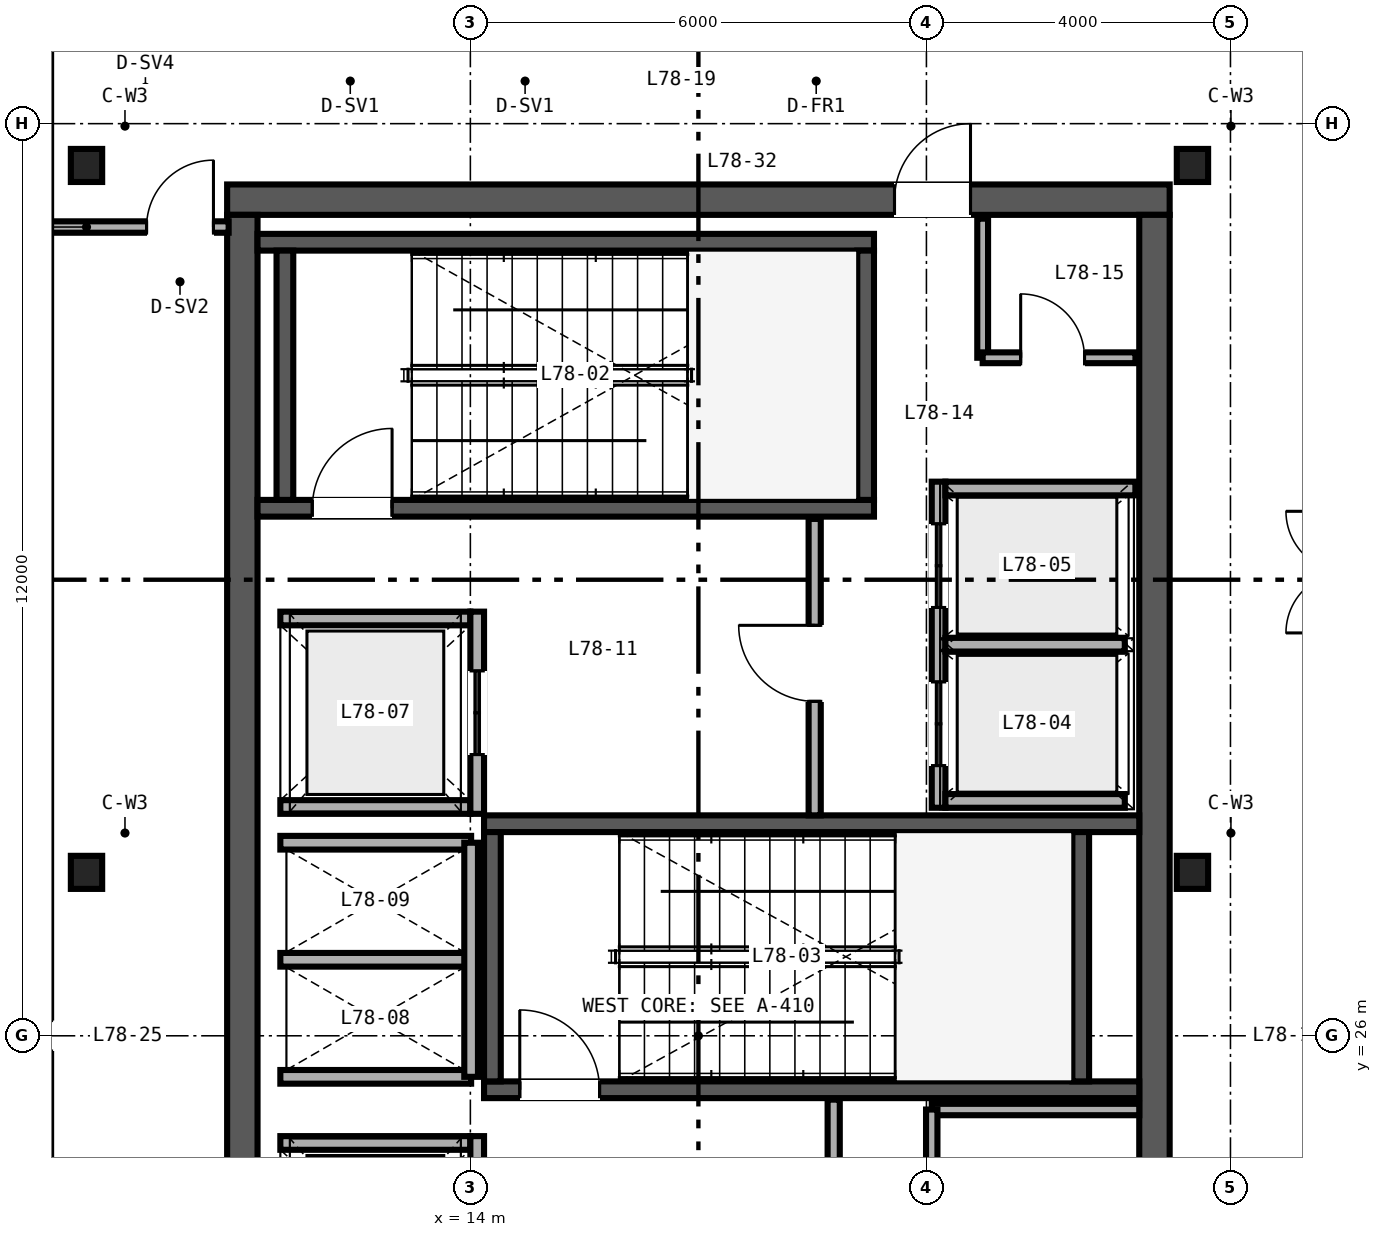
"""IFC4 building model, lengths in metres.
Left out: names, types, materials, properties, quantities, classifications, styles, units other than length and angle.
Written with IfcOpenShell. Run it as: python <this file> out.ifc"""

import sys

from ifc_helpers import new_model, si_unit, direction, frame, frame_2d, origin, origin_2d, place, context, subcontext, project, spatial, rectangle, i_section, extrude, source, transform, mapped, element, fill, save


model = new_model("IFC4")
c1 = context("Model", 3, precision=1e-05, world=origin(), true_north=direction((0.0, 1.0)))
c2 = subcontext(c1, "Body", "Model", "MODEL_VIEW")
j1 = project(units=[si_unit("LENGTHUNIT", "METRE"), si_unit("PLANEANGLEUNIT", "RADIAN")], contexts=[c1])
p1 = place(None, origin())
s1 = spatial("IfcSite", under=j1, at=p1, CompositionType="ELEMENT")
p2 = place(p1, origin())
s2 = spatial("IfcBuilding", under=s1, at=p2, CompositionType="ELEMENT")
p3 = place(p2, frame((0.0, 0.0, 305.4)))
s3 = spatial("IfcBuildingStorey", under=s2, at=p3, CompositionType="ELEMENT", Elevation=305.4)
p4 = place(p3, frame((10.8, 37.0, 0.0), z_axis=(0.0, 0.0, 1.0), x_axis=(1.0, 0.0, 0.0)))
e1 = element("IfcWall", 1, at=p4, inside=s3, PredefinedType="SHEAR", context=c2, shape_type="SweptSolid", body=[
    extrude(rectangle(XDim=12.4, YDim=0.4, at=frame_2d((6.2, 0.0))), origin(), (0.0, 0.0, 1.0), 3.88),
])
p5 = place(p4, frame((8.78, 0.0, 0.0)))
e2 = element("IfcOpeningElement", 2, at=p5, cuts=e1, PredefinedType="OPENING", context=c2, shape_type="SweptSolid", body=[
    extrude(rectangle(XDim=1.0, YDim=2.15, at=frame_2d((0.5, 1.075))), frame((0.0, 0.21, 0.0), z_axis=(0.0, -1.0, 0.0), x_axis=(1.0, 0.0, 0.0)), (0.0, 0.0, 1.0), 0.42),
])
for number, where, z_axis, x_axis in (
    (3, (11.0, 15.2, 0.0), (0.0, 0.0, 1.0), (0.0, 1.0, 0.0)),
    (4, (23.0, 15.2, 0.0), (0.0, 0.0, 1.0), (0.0, 1.0, 0.0)),
):
    element("IfcWall", number, at=place(p3, frame(where, z_axis=z_axis, x_axis=x_axis)), inside=s3, PredefinedType="SHEAR", context=c2, shape_type="SweptSolid", body=[
        extrude(rectangle(XDim=21.6, YDim=0.4, at=frame_2d((10.8, 0.0))), origin(), (0.0, 0.0, 1.0), 3.88),
    ])
p6 = place(p3, frame((11.2, 32.94, 0.0), z_axis=(0.0, 0.0, 1.0), x_axis=(1.0, 0.0, 0.0)))
e5 = element("IfcWall", 5, at=p6, inside=s3, PredefinedType="SHEAR", context=c2, shape_type="SweptSolid", body=[
    extrude(rectangle(XDim=8.11, YDim=0.22, at=frame_2d((4.055, 0.0))), origin(), (0.0, 0.0, 1.0), 4.0),
])
p7 = place(p6, frame((0.72, 0.0, 0.0)))
e6 = element("IfcOpeningElement", 6, at=p7, cuts=e5, PredefinedType="OPENING", context=c2, shape_type="SweptSolid", body=[
    extrude(rectangle(XDim=1.05, YDim=2.15, at=frame_2d((0.525, 1.075))), frame((0.0, 0.12, 0.0), z_axis=(0.0, -1.0, 0.0), x_axis=(1.0, 0.0, 0.0)), (0.0, 0.0, 1.0), 0.24),
])
p8 = place(p3, frame((11.2, 36.44, 0.0), z_axis=(0.0, 0.0, 1.0), x_axis=(1.0, 0.0, 0.0)))
e7 = element("IfcWall", 7, at=p8, inside=s3, PredefinedType="SHEAR", context=c2, shape_type="SweptSolid", body=[
    extrude(rectangle(XDim=8.11, YDim=0.22, at=frame_2d((4.055, 0.0))), origin(), (0.0, 0.0, 1.0), 4.0),
])
for number, where, z_axis, x_axis in (
    (8, (11.56, 33.05, 0.0), (0.0, 0.0, 1.0), (0.0, 1.0, 0.0)),
    (9, (19.2, 33.05, 0.0), (0.0, 0.0, 1.0), (0.0, 1.0, 0.0)),
):
    element("IfcWall", number, at=place(p3, frame(where, z_axis=z_axis, x_axis=x_axis)), inside=s3, PredefinedType="SHEAR", context=c2, shape_type="SweptSolid", body=[
        extrude(rectangle(XDim=3.28, YDim=0.22, at=frame_2d((1.64, 0.0))), origin(), (0.0, 0.0, 1.0), 4.0),
    ])
p9 = place(p3, frame((14.18, 25.29, 0.0), z_axis=(0.0, 0.0, 1.0), x_axis=(1.0, 0.0, 0.0)))
e10 = element("IfcWall", 10, at=p9, inside=s3, PredefinedType="SHEAR", context=c2, shape_type="SweptSolid", body=[
    extrude(rectangle(XDim=8.62, YDim=0.22, at=frame_2d((4.31, 0.0))), origin(), (0.0, 0.0, 1.0), 4.0),
])
p10 = place(p9, frame((0.47, 0.0, 0.0)))
e11 = element("IfcOpeningElement", 11, at=p10, cuts=e10, PredefinedType="OPENING", context=c2, shape_type="SweptSolid", body=[
    extrude(rectangle(XDim=1.05, YDim=2.15, at=frame_2d((0.525, 1.075))), frame((0.0, 0.12, 0.0), z_axis=(0.0, -1.0, 0.0), x_axis=(1.0, 0.0, 0.0)), (0.0, 0.0, 1.0), 0.24),
])
p11 = place(p3, frame((14.18, 28.79, 0.0), z_axis=(0.0, 0.0, 1.0), x_axis=(1.0, 0.0, 0.0)))
e12 = element("IfcWall", 12, at=p11, inside=s3, PredefinedType="SHEAR", context=c2, shape_type="SweptSolid", body=[
    extrude(rectangle(XDim=8.62, YDim=0.22, at=frame_2d((4.31, 0.0))), origin(), (0.0, 0.0, 1.0), 4.0),
])
for number, where, z_axis, x_axis in (
    (13, (14.29, 25.4, 0.0), (0.0, 0.0, 1.0), (0.0, 1.0, 0.0)),
    (14, (22.03, 25.4, 0.0), (0.0, 0.0, 1.0), (0.0, 1.0, 0.0)),
):
    element("IfcWall", number, at=place(p3, frame(where, z_axis=z_axis, x_axis=x_axis)), inside=s3, PredefinedType="SHEAR", context=c2, shape_type="SweptSolid", body=[
        extrude(rectangle(XDim=3.28, YDim=0.22, at=frame_2d((1.64, 0.0))), origin(), (0.0, 0.0, 1.0), 4.0),
    ])
m1 = source(origin(), c2, "Body", "SweptSolid", [
    extrude(i_section(OverallWidth=0.412, OverallDepth=0.435, WebThickness=0.036, FlangeThickness=0.057, FilletRadius=0.025, at=origin_2d()), origin(), (0.0, 0.0, 1.0), 3.88),
])
for number, where, z_axis, x_axis in (
    (15, (8.95, 28.15, 0.0), (0.0, 0.0, 1.0), (1.0, 0.0, 0.0)),
    (16, (23.5, 28.15, 0.0), (0.0, 0.0, 1.0), (1.0, 0.0, 0.0)),
    (17, (8.95, 37.45, 0.0), (0.0, 0.0, 1.0), (1.0, 0.0, 0.0)),
    (18, (23.5, 37.45, 0.0), (0.0, 0.0, 1.0), (1.0, 0.0, 0.0)),
):
    element("IfcColumn", number, at=place(p3, frame(where, z_axis=z_axis, x_axis=x_axis)), inside=s3, PredefinedType="COLUMN", context=c2, shape_type="MappedRepresentation", body=[
        mapped(m1, transform((0.0, 0.0, 0.0), scale=1.0)),
    ])
p12 = place(p3, frame((20.16, 29.0, 0.0), z_axis=(0.0, 0.0, 1.0), x_axis=(0.0, 1.0, 0.0)))
e19 = element("IfcWall", 19, at=p12, inside=s3, PredefinedType="SOLIDWALL", context=c2, shape_type="SweptSolid", body=[
    extrude(rectangle(XDim=4.29, YDim=0.18, at=frame_2d((2.145, 0.0))), origin(), (0.0, 0.0, 1.0), 3.88),
])
p13 = place(p12, frame((0.555, 0.0, 0.0)))
e20 = element("IfcOpeningElement", 20, at=p13, cuts=e19, PredefinedType="OPENING", context=c2, shape_type="SweptSolid", body=[
    extrude(rectangle(XDim=1.1, YDim=2.2, at=frame_2d((0.55, 1.1))), frame((0.0, 0.1, 0.0), z_axis=(0.0, -1.0, 0.0), x_axis=(1.0, 0.0, 0.0)), (0.0, 0.0, 1.0), 0.2),
])
p14 = place(p12, frame((2.635, 0.0, 0.0)))
e21 = element("IfcOpeningElement", 21, at=p14, cuts=e19, PredefinedType="OPENING", context=c2, shape_type="SweptSolid", body=[
    extrude(rectangle(XDim=1.1, YDim=2.2, at=frame_2d((0.55, 1.1))), frame((0.0, 0.1, 0.0), z_axis=(0.0, -1.0, 0.0), x_axis=(1.0, 0.0, 0.0)), (0.0, 0.0, 1.0), 0.2),
])
p15 = place(p3, frame((20.25, 29.09, 0.0), z_axis=(0.0, 0.0, 1.0), x_axis=(1.0, 0.0, 0.0)))
e22 = element("IfcWall", 22, at=p15, inside=s3, PredefinedType="SOLIDWALL", context=c2, shape_type="SweptSolid", body=[
    extrude(rectangle(XDim=2.36, YDim=0.18, at=frame_2d((1.18, 0.0))), origin(), (0.0, 0.0, 1.0), 3.88),
])
p16 = place(p3, frame((20.25, 33.2, 0.0), z_axis=(0.0, 0.0, 1.0), x_axis=(1.0, 0.0, 0.0)))
e23 = element("IfcWall", 23, at=p16, inside=s3, PredefinedType="SOLIDWALL", context=c2, shape_type="SweptSolid", body=[
    extrude(rectangle(XDim=2.5, YDim=0.18, at=frame_2d((1.25, 0.0))), origin(), (0.0, 0.0, 1.0), 3.88),
])
p17 = place(p3, frame((20.25, 31.145, 0.0), z_axis=(0.0, 0.0, 1.0), x_axis=(1.0, 0.0, 0.0)))
e24 = element("IfcWall", 24, at=p17, inside=s3, PredefinedType="SOLIDWALL", context=c2, shape_type="SweptSolid", body=[
    extrude(rectangle(XDim=2.36, YDim=0.18, at=frame_2d((1.18, 0.0))), origin(), (0.0, 0.0, 1.0), 3.88),
])
p18 = place(p3, frame((11.5, 24.59, 0.0), z_axis=(0.0, 0.0, 1.0), x_axis=(1.0, 0.0, 0.0)))
e25 = element("IfcWall", 25, at=p18, inside=s3, PredefinedType="SOLIDWALL", context=c2, shape_type="SweptSolid", body=[
    extrude(rectangle(XDim=2.5, YDim=0.18, at=frame_2d((1.25, 0.0))), origin(), (0.0, 0.0, 1.0), 3.88),
])
p19 = place(p3, frame((14.09, 22.02, 0.0), z_axis=(0.0, 0.0, 1.0), x_axis=(0.0, 1.0, 0.0)))
e26 = element("IfcWall", 26, at=p19, inside=s3, PredefinedType="SOLIDWALL", context=c2, shape_type="SweptSolid", body=[
    extrude(rectangle(XDim=2.66, YDim=0.18, at=frame_2d((1.33, 0.0))), origin(), (0.0, 0.0, 1.0), 3.88),
])
p20 = place(p19, frame((0.78, 0.0, 0.0)))
e27 = element("IfcOpeningElement", 27, at=p20, cuts=e26, PredefinedType="OPENING", context=c2, shape_type="SweptSolid", body=[
    extrude(rectangle(XDim=1.1, YDim=2.2, at=frame_2d((0.55, 1.1))), frame((0.0, 0.1, 0.0), z_axis=(0.0, -1.0, 0.0), x_axis=(1.0, 0.0, 0.0)), (0.0, 0.0, 1.0), 0.2),
])
for number, where, z_axis, x_axis in (
    (28, (11.5, 29.01, 0.0), (0.0, 0.0, 1.0), (1.0, 0.0, 0.0)),
    (29, (11.5, 31.49, 0.0), (0.0, 0.0, 1.0), (1.0, 0.0, 0.0)),
):
    element("IfcWall", number, at=place(p3, frame(where, z_axis=z_axis, x_axis=x_axis)), inside=s3, PredefinedType="SOLIDWALL", context=c2, shape_type="SweptSolid", body=[
        extrude(rectangle(XDim=2.5, YDim=0.18, at=frame_2d((1.25, 0.0))), origin(), (0.0, 0.0, 1.0), 3.88),
    ])
p21 = place(p3, frame((14.09, 28.92, 0.0), z_axis=(0.0, 0.0, 1.0), x_axis=(0.0, 1.0, 0.0)))
e30 = element("IfcWall", 30, at=p21, inside=s3, PredefinedType="SOLIDWALL", context=c2, shape_type="SweptSolid", body=[
    extrude(rectangle(XDim=2.66, YDim=0.18, at=frame_2d((1.33, 0.0))), origin(), (0.0, 0.0, 1.0), 3.88),
])
p22 = place(p21, frame((0.78, 0.0, 0.0)))
e31 = element("IfcOpeningElement", 31, at=p22, cuts=e30, PredefinedType="OPENING", context=c2, shape_type="SweptSolid", body=[
    extrude(rectangle(XDim=1.1, YDim=2.2, at=frame_2d((0.55, 1.1))), frame((0.0, 0.1, 0.0), z_axis=(0.0, -1.0, 0.0), x_axis=(1.0, 0.0, 0.0)), (0.0, 0.0, 1.0), 0.2),
])
for number, where, z_axis, x_axis in (
    (32, (11.5, 25.46, 0.0), (0.0, 0.0, 1.0), (1.0, 0.0, 0.0)),
    (33, (11.5, 27.0, 0.0), (0.0, 0.0, 1.0), (1.0, 0.0, 0.0)),
    (34, (11.5, 28.54, 0.0), (0.0, 0.0, 1.0), (1.0, 0.0, 0.0)),
):
    element("IfcWall", number, at=place(p3, frame(where, z_axis=z_axis, x_axis=x_axis)), inside=s3, PredefinedType="SOLIDWALL", context=c2, shape_type="SweptSolid", body=[
        extrude(rectangle(XDim=2.51, YDim=0.18, at=frame_2d((1.255, 0.0))), origin(), (0.0, 0.0, 1.0), 3.88),
    ])
p23 = place(p3, frame((14.01, 25.46, 0.0), z_axis=(0.0, 0.0, 1.0), x_axis=(0.0, 1.0, 0.0)))
e35 = element("IfcWall", 35, at=p23, inside=s3, PredefinedType="SOLIDWALL", context=c2, shape_type="SweptSolid", body=[
    extrude(rectangle(XDim=3.08, YDim=0.18, at=frame_2d((1.54, 0.0))), origin(), (0.0, 0.0, 1.0), 3.88),
])
p24 = place(p3, frame((18.78, 21.35, 0.0), z_axis=(0.0, 0.0, 1.0), x_axis=(0.0, 1.0, 0.0)))
e36 = element("IfcWall", 36, at=p24, inside=s3, PredefinedType="PARTITIONING", context=c2, shape_type="SweptSolid", body=[
    extrude(rectangle(XDim=3.81, YDim=0.16, at=frame_2d((1.905, 0.0))), origin(), (0.0, 0.0, 1.0), 3.88),
])
p25 = place(p3, frame((18.53, 28.9, 0.0), z_axis=(0.0, 0.0, 1.0), x_axis=(0.0, 1.0, 0.0)))
e37 = element("IfcWall", 37, at=p25, inside=s3, PredefinedType="PARTITIONING", context=c2, shape_type="SweptSolid", body=[
    extrude(rectangle(XDim=3.9, YDim=0.16, at=frame_2d((1.95, 0.0))), origin(), (0.0, 0.0, 1.0), 3.88),
])
p26 = place(p25, frame((1.5, 0.0, 0.0)))
e38 = element("IfcOpeningElement", 38, at=p26, cuts=e37, PredefinedType="OPENING", context=c2, shape_type="SweptSolid", body=[
    extrude(rectangle(XDim=1.0, YDim=2.15, at=frame_2d((0.5, 1.075))), frame((0.0, 0.09, 0.0), z_axis=(0.0, -1.0, 0.0), x_axis=(1.0, 0.0, 0.0)), (0.0, 0.0, 1.0), 0.18),
])
p27 = place(p3, frame((20.74, 34.92, 0.0), z_axis=(0.0, 0.0, 1.0), x_axis=(0.0, 1.0, 0.0)))
e39 = element("IfcWall", 39, at=p27, inside=s3, PredefinedType="PARTITIONING", context=c2, shape_type="SweptSolid", body=[
    extrude(rectangle(XDim=1.83, YDim=0.142, at=frame_2d((0.915, 0.0))), origin(), (0.0, 0.0, 1.0), 3.88),
])
p28 = place(p3, frame((20.74, 34.92, 0.0), z_axis=(0.0, 0.0, 1.0), x_axis=(1.0, 0.0, 0.0)))
e40 = element("IfcWall", 40, at=p28, inside=s3, PredefinedType="PARTITIONING", context=c2, shape_type="SweptSolid", body=[
    extrude(rectangle(XDim=2.01, YDim=0.142, at=frame_2d((1.005, 0.0))), origin(), (0.0, 0.0, 1.0), 3.88),
])
p29 = place(p28, frame((0.5, 0.0, 0.0)))
e41 = element("IfcOpeningElement", 41, at=p29, cuts=e40, PredefinedType="OPENING", context=c2, shape_type="SweptSolid", body=[
    extrude(rectangle(XDim=0.84, YDim=2.1, at=frame_2d((0.42, 1.05))), frame((0.0, 0.081, 0.0), z_axis=(0.0, -1.0, 0.0), x_axis=(1.0, 0.0, 0.0)), (0.0, 0.0, 1.0), 0.162),
])
p30 = place(p3, frame((20.07, 25.03, 0.0), z_axis=(0.0, 0.0, 1.0), x_axis=(1.0, 0.0, 0.0)))
e42 = element("IfcWall", 42, at=p30, inside=s3, PredefinedType="PARTITIONING", context=c2, shape_type="SweptSolid", body=[
    extrude(rectangle(XDim=2.73, YDim=0.15, at=frame_2d((1.365, 0.0))), origin(), (0.0, 0.0, 1.0), 3.88),
])
p31 = place(p3, frame((20.07, 18.92, 0.0), z_axis=(0.0, 0.0, 1.0), x_axis=(0.0, 1.0, 0.0)))
e43 = element("IfcWall", 43, at=p31, inside=s3, PredefinedType="PARTITIONING", context=c2, shape_type="SweptSolid", body=[
    extrude(rectangle(XDim=6.11, YDim=0.15, at=frame_2d((3.055, 0.0))), origin(), (0.0, 0.0, 1.0), 2.98),
])
p32 = place(p31, frame((1.65, 0.0, 0.0)))
e44 = element("IfcOpeningElement", 44, at=p32, cuts=e43, PredefinedType="OPENING", context=c2, shape_type="SweptSolid", body=[
    extrude(rectangle(XDim=0.92, YDim=2.15, at=frame_2d((0.46, 1.075))), frame((0.0, 0.085, 0.0), z_axis=(0.0, -1.0, 0.0), x_axis=(1.0, 0.0, 0.0)), (0.0, 0.0, 1.0), 0.17),
])
p33 = place(p3, frame((8.16, 36.64, 0.0), z_axis=(0.0, 0.0, 1.0), x_axis=(1.0, 0.0, 0.0)))
e45 = element("IfcWall", 45, at=p33, inside=s3, PredefinedType="PARTITIONING", context=c2, shape_type="SweptSolid", body=[
    extrude(rectangle(XDim=2.66, YDim=0.15, at=frame_2d((1.33, 0.0))), origin(), (0.0, 0.0, 1.0), 3.263),
])
p34 = place(p33, frame((1.58, 0.0, 0.0)))
e46 = element("IfcOpeningElement", 46, at=p34, cuts=e45, PredefinedType="OPENING", context=c2, shape_type="SweptSolid", body=[
    extrude(rectangle(XDim=0.88, YDim=2.15, at=frame_2d((0.44, 1.075))), frame((0.0, 0.085, 0.0), z_axis=(0.0, -1.0, 0.0), x_axis=(1.0, 0.0, 0.0)), (0.0, 0.0, 1.0), 0.17),
])
m2 = source(origin(), c2, "Body", "SweptSolid", [
    extrude(rectangle(XDim=1.05, YDim=2.15, at=frame_2d((0.525, 1.075))), frame((0.0, 0.025, 0.0), z_axis=(0.0, -1.0, 0.0), x_axis=(1.0, 0.0, 0.0)), (0.0, 0.0, 1.0), 0.05),
])
p35 = place(p7, origin())
e47 = element("IfcDoor", 47, at=p35, inside=s3, OperationType="SINGLE_SWING_RIGHT", PredefinedType="DOOR", context=c2, shape_type="MappedRepresentation", body=[
    mapped(m2, transform((0.0, 0.0, 0.0), scale=1.0)),
])
fill(e6, e47)
p36 = place(p10, origin())
e48 = element("IfcDoor", 48, at=p36, inside=s3, OperationType="SINGLE_SWING_LEFT", PredefinedType="DOOR", context=c2, shape_type="MappedRepresentation", body=[
    mapped(m2, transform((0.0, 0.0, 0.0), scale=1.0)),
])
fill(e11, e48)
m3 = source(origin(), c2, "Body", "SweptSolid", [
    extrude(rectangle(XDim=1.1, YDim=2.2, at=frame_2d((0.55, 1.1))), frame((0.0, 0.025, 0.0), z_axis=(0.0, -1.0, 0.0), x_axis=(1.0, 0.0, 0.0)), (0.0, 0.0, 1.0), 0.05),
])
p37 = place(p13, origin())
e49 = element("IfcDoor", 49, at=p37, inside=s3, OperationType="DOUBLE_DOOR_SLIDING", PredefinedType="DOOR", context=c2, shape_type="MappedRepresentation", body=[
    mapped(m3, transform((0.0, 0.0, 0.0), scale=1.0)),
])
fill(e20, e49)
p38 = place(p14, origin())
e50 = element("IfcDoor", 50, at=p38, inside=s3, OperationType="DOUBLE_DOOR_SLIDING", PredefinedType="DOOR", context=c2, shape_type="MappedRepresentation", body=[
    mapped(m3, transform((0.0, 0.0, 0.0), scale=1.0)),
])
fill(e21, e50)
p39 = place(p22, origin())
e51 = element("IfcDoor", 51, at=p39, inside=s3, OperationType="DOUBLE_DOOR_SLIDING", PredefinedType="DOOR", context=c2, shape_type="MappedRepresentation", body=[
    mapped(m3, transform((0.0, 0.0, 0.0), scale=1.0)),
])
fill(e31, e51)
m4 = source(origin(), c2, "Body", "SweptSolid", [
    extrude(rectangle(XDim=1.0, YDim=2.15, at=frame_2d((0.5, 1.075))), frame((0.0, 0.025, 0.0), z_axis=(0.0, -1.0, 0.0), x_axis=(1.0, 0.0, 0.0)), (0.0, 0.0, 1.0), 0.05),
])
p40 = place(p26, origin())
e52 = element("IfcDoor", 52, at=p40, inside=s3, OperationType="SINGLE_SWING_RIGHT", PredefinedType="DOOR", context=c2, shape_type="MappedRepresentation", body=[
    mapped(m4, transform((0.0, 0.0, 0.0), scale=1.0)),
])
fill(e38, e52)
m5 = source(origin(), c2, "Body", "SweptSolid", [
    extrude(rectangle(XDim=0.84, YDim=2.1, at=frame_2d((0.42, 1.05))), frame((0.0, 0.025, 0.0), z_axis=(0.0, -1.0, 0.0), x_axis=(1.0, 0.0, 0.0)), (0.0, 0.0, 1.0), 0.05),
])
p41 = place(p29, origin())
e53 = element("IfcDoor", 53, at=p41, inside=s3, OperationType="SINGLE_SWING_LEFT", PredefinedType="DOOR", context=c2, shape_type="MappedRepresentation", body=[
    mapped(m5, transform((0.0, 0.0, 0.0), scale=1.0)),
])
fill(e41, e53)
p42 = place(p5, origin())
e54 = element("IfcDoor", 54, at=p42, inside=s3, OperationType="SINGLE_SWING_RIGHT", PredefinedType="DOOR", context=c2, shape_type="MappedRepresentation", body=[
    mapped(m4, transform((0.0, 0.0, 0.0), scale=1.0)),
])
fill(e2, e54)
m6 = source(origin(), c2, "Body", "SweptSolid", [
    extrude(rectangle(XDim=0.88, YDim=2.15, at=frame_2d((0.44, 1.075))), frame((0.0, 0.025, 0.0), z_axis=(0.0, -1.0, 0.0), x_axis=(1.0, 0.0, 0.0)), (0.0, 0.0, 1.0), 0.05),
])
p43 = place(p34, origin())
e55 = element("IfcDoor", 55, at=p43, inside=s3, OperationType="SINGLE_SWING_RIGHT", PredefinedType="DOOR", context=c2, shape_type="MappedRepresentation", body=[
    mapped(m6, transform((0.0, 0.0, 0.0), scale=1.0)),
])
fill(e46, e55)
save(model, sys.argv[1])
